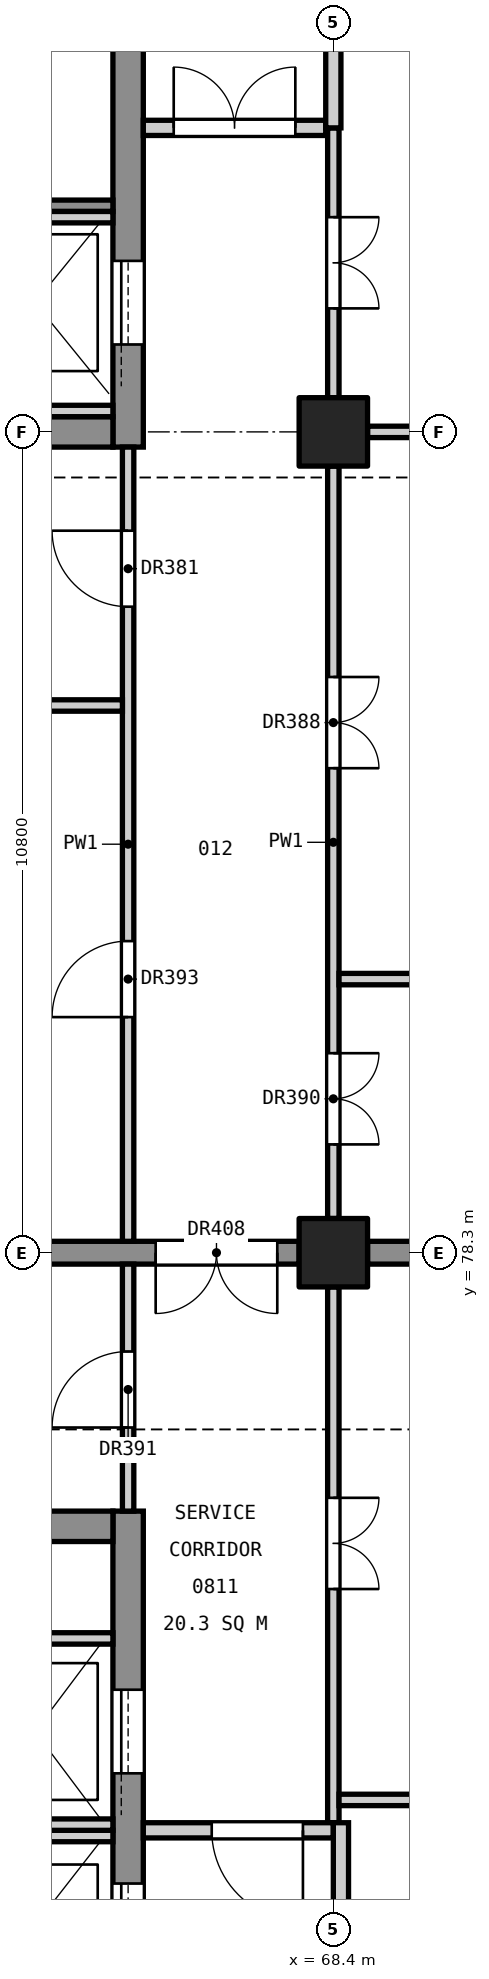
"""IFC4 building model, lengths in metres.
Left out: names, types, materials, properties, quantities, classifications, styles, units other than length and angle.
Written with IfcOpenShell. Run it as: python <this file> out.ifc"""

import sys

from ifc_helpers import new_model, si_unit, direction, frame, frame_2d, origin, origin_2d, place, context, subcontext, project, spatial, rectangle, extrude, element, fill, save


model = new_model("IFC4")
c1 = context("Model", 3, precision=1e-05, world=origin(), true_north=direction((0.0, 1.0)))
c2 = subcontext(c1, "Body", "Model", "MODEL_VIEW")
j1 = project(units=[si_unit("LENGTHUNIT", "METRE"), si_unit("PLANEANGLEUNIT", "RADIAN")], contexts=[c1])
p1 = place(None, origin())
s1 = spatial("IfcSite", under=j1, at=p1, CompositionType="ELEMENT")
p2 = place(p1, origin())
s2 = spatial("IfcBuilding", under=s1, at=p2, CompositionType="ELEMENT")
p3 = place(p2, frame((0.0, 0.0, 41.4)))
s3 = spatial("IfcBuildingStorey", under=s2, at=p3, CompositionType="ELEMENT", Elevation=41.4)
for number, where, z_axis, x_axis in (
    (1, (68.4, 78.3, 0.0), (0.0, 0.0, 1.0), (1.0, 0.0, 0.0)),
    (2, (68.4, 89.1, 0.0), (0.0, 0.0, 1.0), (1.0, 0.0, 0.0)),
):
    element("IfcColumn", number, at=place(p3, frame(where, z_axis=z_axis, x_axis=x_axis)), inside=s3, PredefinedType="COLUMN", context=c2, shape_type="SweptSolid", body=[
        extrude(rectangle(XDim=0.9, YDim=0.9, at=origin_2d()), origin(), (0.0, 0.0, 1.0), 4.8),
    ])
p4 = place(p3, frame((65.7, 60.1, 0.0), z_axis=(0.0, 0.0, 1.0), x_axis=(0.0, 1.0, 0.0)))
e3 = element("IfcWall", 3, at=p4, inside=s3, PredefinedType="SHEAR", context=c2, shape_type="SweptSolid", body=[
    extrude(rectangle(XDim=14.8, YDim=0.4, at=frame_2d((7.4, 0.0))), origin(), (0.0, 0.0, 1.0), 4.55),
])
p5 = place(p4, frame((0.5, 0.0, 0.0)))
e4 = element("IfcOpeningElement", 4, at=p5, cuts=e3, PredefinedType="OPENING", context=c2, shape_type="SweptSolid", body=[
    extrude(rectangle(XDim=1.4, YDim=2.1, at=frame_2d((0.7, 1.05))), frame((0.0, 0.21, 0.0), z_axis=(0.0, -1.0, 0.0), x_axis=(1.0, 0.0, 0.0)), (0.0, 0.0, 1.0), 0.42),
])
p6 = place(p4, frame((8.8, 0.0, 0.0)))
e5 = element("IfcOpeningElement", 5, at=p6, cuts=e3, PredefinedType="OPENING", context=c2, shape_type="SweptSolid", body=[
    extrude(rectangle(XDim=1.1, YDim=2.1, at=frame_2d((0.55, 1.05))), frame((0.0, 0.21, 0.0), z_axis=(0.0, -1.0, 0.0), x_axis=(1.0, 0.0, 0.0)), (0.0, 0.0, 1.0), 0.42),
])
p7 = place(p4, frame((11.35, 0.0, 0.0)))
e6 = element("IfcOpeningElement", 6, at=p7, cuts=e3, PredefinedType="OPENING", context=c2, shape_type="SweptSolid", body=[
    extrude(rectangle(XDim=1.1, YDim=2.1, at=frame_2d((0.55, 1.05))), frame((0.0, 0.21, 0.0), z_axis=(0.0, -1.0, 0.0), x_axis=(1.0, 0.0, 0.0)), (0.0, 0.0, 1.0), 0.42),
])
p8 = place(p3, frame((61.4, 74.7, 0.0), z_axis=(0.0, 0.0, 1.0), x_axis=(1.0, 0.0, 0.0)))
e7 = element("IfcWall", 7, at=p8, inside=s3, PredefinedType="SHEAR", context=c2, shape_type="SweptSolid", body=[
    extrude(rectangle(XDim=4.1, YDim=0.4, at=frame_2d((2.05, 0.0))), origin(), (0.0, 0.0, 1.0), 4.55),
])
p9 = place(p3, frame((65.7, 88.9, 0.0), z_axis=(0.0, 0.0, 1.0), x_axis=(0.0, 1.0, 0.0)))
e8 = element("IfcWall", 8, at=p9, inside=s3, PredefinedType="SHEAR", context=c2, shape_type="SweptSolid", body=[
    extrude(rectangle(XDim=11.2, YDim=0.4, at=frame_2d((5.6, 0.0))), origin(), (0.0, 0.0, 1.0), 4.55),
])
p10 = place(p9, frame((9.3, 0.0, 0.0)))
e9 = element("IfcOpeningElement", 9, at=p10, cuts=e8, PredefinedType="OPENING", context=c2, shape_type="SweptSolid", body=[
    extrude(rectangle(XDim=1.4, YDim=2.1, at=frame_2d((0.7, 1.05))), frame((0.0, 0.21, 0.0), z_axis=(0.0, -1.0, 0.0), x_axis=(1.0, 0.0, 0.0)), (0.0, 0.0, 1.0), 0.42),
])
p11 = place(p9, frame((1.35, 0.0, 0.0)))
e10 = element("IfcOpeningElement", 10, at=p11, cuts=e8, PredefinedType="OPENING", context=c2, shape_type="SweptSolid", body=[
    extrude(rectangle(XDim=1.1, YDim=2.1, at=frame_2d((0.55, 1.05))), frame((0.0, 0.21, 0.0), z_axis=(0.0, -1.0, 0.0), x_axis=(1.0, 0.0, 0.0)), (0.0, 0.0, 1.0), 0.42),
])
p12 = place(p3, frame((61.4, 89.1, 0.0), z_axis=(0.0, 0.0, 1.0), x_axis=(1.0, 0.0, 0.0)))
e11 = element("IfcWall", 11, at=p12, inside=s3, PredefinedType="SHEAR", context=c2, shape_type="SweptSolid", body=[
    extrude(rectangle(XDim=4.1, YDim=0.4, at=frame_2d((2.05, 0.0))), origin(), (0.0, 0.0, 1.0), 4.55),
])
p13 = place(p3, frame((61.65, 78.3, 0.0), z_axis=(0.0, 0.0, 1.0), x_axis=(1.0, 0.0, 0.0)))
e12 = element("IfcWall", 12, at=p13, inside=s3, PredefinedType="SHEAR", context=c2, shape_type="SweptSolid", body=[
    extrude(rectangle(XDim=6.3, YDim=0.3, at=frame_2d((3.15, 0.0))), origin(), (0.0, 0.0, 1.0), 4.55),
])
p14 = place(p13, frame((4.413, 0.0, 0.0)))
e13 = element("IfcOpeningElement", 13, at=p14, cuts=e12, PredefinedType="OPENING", context=c2, shape_type="SweptSolid", body=[
    extrude(rectangle(XDim=1.6, YDim=2.1, at=frame_2d((0.8, 1.05))), frame((0.0, 0.16, 0.0), z_axis=(0.0, -1.0, 0.0), x_axis=(1.0, 0.0, 0.0)), (0.0, 0.0, 1.0), 0.32),
])
p15 = place(p3, frame((68.85, 78.3, 0.0), z_axis=(0.0, 0.0, 1.0), x_axis=(1.0, 0.0, 0.0)))
e14 = element("IfcWall", 14, at=p15, inside=s3, PredefinedType="SHEAR", context=c2, shape_type="SweptSolid", body=[
    extrude(rectangle(XDim=9.9, YDim=0.3, at=frame_2d((4.95, 0.0))), origin(), (0.0, 0.0, 1.0), 4.55),
])
p16 = place(p3, frame((61.4, 92.075, 0.0), z_axis=(0.0, 0.0, 1.0), x_axis=(1.0, 0.0, 0.0)))
e15 = element("IfcWall", 15, at=p16, inside=s3, PredefinedType="SOLIDWALL", context=c2, shape_type="SweptSolid", body=[
    extrude(rectangle(XDim=4.1, YDim=0.15, at=frame_2d((2.05, 0.0))), origin(), (0.0, 0.0, 1.0), 4.55),
])
for number, where, z_axis, x_axis in (
    (16, (63.65, 70.625, 0.0), (0.0, 0.0, 1.0), (1.0, 0.0, 0.0)),
    (17, (63.65, 70.775, 0.0), (0.0, 0.0, 1.0), (1.0, 0.0, 0.0)),
    (18, (63.65, 73.225, 0.0), (0.0, 0.0, 1.0), (1.0, 0.0, 0.0)),
    (19, (63.65, 91.925, 0.0), (0.0, 0.0, 1.0), (1.0, 0.0, 0.0)),
    (20, (63.65, 89.375, 0.0), (0.0, 0.0, 1.0), (1.0, 0.0, 0.0)),
):
    element("IfcWall", number, at=place(p3, frame(where, z_axis=z_axis, x_axis=x_axis)), inside=s3, PredefinedType="SOLIDWALL", context=c2, shape_type="SweptSolid", body=[
        extrude(rectangle(XDim=1.85, YDim=0.15, at=frame_2d((0.925, 0.0))), origin(), (0.0, 0.0, 1.0), 4.8),
    ])
p17 = place(p3, frame((65.7, 74.9, 0.0), z_axis=(0.0, 0.0, 1.0), x_axis=(0.0, 1.0, 0.0)))
e21 = element("IfcWall", 21, at=p17, inside=s3, PredefinedType="PARTITIONING", context=c2, shape_type="SweptSolid", body=[
    extrude(rectangle(XDim=3.25, YDim=0.15, at=frame_2d((1.625, 0.0))), origin(), (0.0, 0.0, 1.0), 3.55),
])
p18 = place(p17, frame((1.1, 0.0, 0.0)))
e22 = element("IfcOpeningElement", 22, at=p18, cuts=e21, PredefinedType="OPENING", context=c2, shape_type="SweptSolid", body=[
    extrude(rectangle(XDim=1.0, YDim=2.1, at=frame_2d((0.5, 1.05))), frame((0.0, 0.085, 0.0), z_axis=(0.0, -1.0, 0.0), x_axis=(1.0, 0.0, 0.0)), (0.0, 0.0, 1.0), 0.17),
])
p19 = place(p3, frame((65.7, 78.45, 0.0), z_axis=(0.0, 0.0, 1.0), x_axis=(0.0, 1.0, 0.0)))
e23 = element("IfcWall", 23, at=p19, inside=s3, PredefinedType="PARTITIONING", context=c2, shape_type="SweptSolid", body=[
    extrude(rectangle(XDim=10.45, YDim=0.15, at=frame_2d((5.225, 0.0))), origin(), (0.0, 0.0, 1.0), 3.55),
])
p20 = place(p19, frame((8.35, 0.0, 0.0)))
e24 = element("IfcOpeningElement", 24, at=p20, cuts=e23, PredefinedType="OPENING", context=c2, shape_type="SweptSolid", body=[
    extrude(rectangle(XDim=1.0, YDim=2.1, at=frame_2d((0.5, 1.05))), frame((0.0, 0.085, 0.0), z_axis=(0.0, -1.0, 0.0), x_axis=(1.0, 0.0, 0.0)), (0.0, 0.0, 1.0), 0.17),
])
p21 = place(p19, frame((2.95, 0.0, 0.0)))
e25 = element("IfcOpeningElement", 25, at=p21, cuts=e23, PredefinedType="OPENING", context=c2, shape_type="SweptSolid", body=[
    extrude(rectangle(XDim=1.0, YDim=2.1, at=frame_2d((0.5, 1.05))), frame((0.0, 0.085, 0.0), z_axis=(0.0, -1.0, 0.0), x_axis=(1.0, 0.0, 0.0)), (0.0, 0.0, 1.0), 0.17),
])
p22 = place(p3, frame((61.35, 85.5, 0.0), z_axis=(0.0, 0.0, 1.0), x_axis=(1.0, 0.0, 0.0)))
e26 = element("IfcWall", 26, at=p22, inside=s3, PredefinedType="PARTITIONING", context=c2, shape_type="SweptSolid", body=[
    extrude(rectangle(XDim=4.275, YDim=0.15, at=frame_2d((2.137, 0.0))), origin(), (0.0, 0.0, 1.0), 3.85),
])
p23 = place(p3, frame((65.9, 93.1, 0.0), z_axis=(0.0, 0.0, 1.0), x_axis=(1.0, 0.0, 0.0)))
e27 = element("IfcWall", 27, at=p23, inside=s3, PredefinedType="PARTITIONING", context=c2, shape_type="SweptSolid", body=[
    extrude(rectangle(XDim=2.4, YDim=0.2, at=frame_2d((1.2, 0.0))), origin(), (0.0, 0.0, 1.0), 3.55),
])
p24 = place(p23, frame((0.4, 0.0, 0.0)))
e28 = element("IfcOpeningElement", 28, at=p24, cuts=e27, PredefinedType="OPENING", context=c2, shape_type="SweptSolid", body=[
    extrude(rectangle(XDim=1.6, YDim=2.1, at=frame_2d((0.8, 1.05))), frame((0.0, 0.11, 0.0), z_axis=(0.0, -1.0, 0.0), x_axis=(1.0, 0.0, 0.0)), (0.0, 0.0, 1.0), 0.22),
])
p25 = place(p3, frame((68.4, 70.8, 0.0), z_axis=(0.0, 0.0, 1.0), x_axis=(0.0, 1.0, 0.0)))
e29 = element("IfcWall", 29, at=p25, inside=s3, PredefinedType="PARTITIONING", context=c2, shape_type="SweptSolid", body=[
    extrude(rectangle(XDim=7.05, YDim=0.15, at=frame_2d((3.525, 0.0))), origin(), (0.0, 0.0, 1.0), 3.55),
])
p26 = place(p25, frame((3.075, 0.0, 0.0)))
e30 = element("IfcOpeningElement", 30, at=p26, cuts=e29, PredefinedType="OPENING", context=c2, shape_type="SweptSolid", body=[
    extrude(rectangle(XDim=1.2, YDim=2.1, at=frame_2d((0.6, 1.05))), frame((0.0, 0.085, 0.0), z_axis=(0.0, -1.0, 0.0), x_axis=(1.0, 0.0, 0.0)), (0.0, 0.0, 1.0), 0.17),
])
p27 = place(p3, frame((68.4, 78.75, 0.0), z_axis=(0.0, 0.0, 1.0), x_axis=(0.0, 1.0, 0.0)))
e31 = element("IfcWall", 31, at=p27, inside=s3, PredefinedType="PARTITIONING", context=c2, shape_type="SweptSolid", body=[
    extrude(rectangle(XDim=9.9, YDim=0.15, at=frame_2d((4.95, 0.0))), origin(), (0.0, 0.0, 1.0), 3.55),
])
p28 = place(p27, frame((5.925, 0.0, 0.0)))
e32 = element("IfcOpeningElement", 32, at=p28, cuts=e31, PredefinedType="OPENING", context=c2, shape_type="SweptSolid", body=[
    extrude(rectangle(XDim=1.2, YDim=2.1, at=frame_2d((0.6, 1.05))), frame((0.0, 0.085, 0.0), z_axis=(0.0, -1.0, 0.0), x_axis=(1.0, 0.0, 0.0)), (0.0, 0.0, 1.0), 0.17),
])
p29 = place(p27, frame((0.975, 0.0, 0.0)))
e33 = element("IfcOpeningElement", 33, at=p29, cuts=e31, PredefinedType="OPENING", context=c2, shape_type="SweptSolid", body=[
    extrude(rectangle(XDim=1.2, YDim=2.1, at=frame_2d((0.6, 1.05))), frame((0.0, 0.085, 0.0), z_axis=(0.0, -1.0, 0.0), x_axis=(1.0, 0.0, 0.0)), (0.0, 0.0, 1.0), 0.17),
])
p30 = place(p3, frame((68.4, 89.55, 0.0), z_axis=(0.0, 0.0, 1.0), x_axis=(0.0, 1.0, 0.0)))
e34 = element("IfcWall", 34, at=p30, inside=s3, PredefinedType="PARTITIONING", context=c2, shape_type="SweptSolid", body=[
    extrude(rectangle(XDim=3.55, YDim=0.15, at=frame_2d((1.775, 0.0))), origin(), (0.0, 0.0, 1.0), 3.55),
])
p31 = place(p30, frame((1.175, 0.0, 0.0)))
e35 = element("IfcOpeningElement", 35, at=p31, cuts=e34, PredefinedType="OPENING", context=c2, shape_type="SweptSolid", body=[
    extrude(rectangle(XDim=1.2, YDim=2.1, at=frame_2d((0.6, 1.05))), frame((0.0, 0.085, 0.0), z_axis=(0.0, -1.0, 0.0), x_axis=(1.0, 0.0, 0.0)), (0.0, 0.0, 1.0), 0.17),
])
p32 = place(p3, frame((68.4, 93.1, 0.0), z_axis=(0.0, 0.0, 1.0), x_axis=(0.0, 1.0, 0.0)))
e36 = element("IfcWall", 36, at=p32, inside=s3, PredefinedType="PARTITIONING", context=c2, shape_type="SweptSolid", body=[
    extrude(rectangle(XDim=6.35, YDim=0.2, at=frame_2d((3.175, 0.0))), origin(), (0.0, 0.0, 1.0), 3.55),
])
p33 = place(p3, frame((65.9, 70.7, 0.0), z_axis=(0.0, 0.0, 1.0), x_axis=(1.0, 0.0, 0.0)))
e37 = element("IfcWall", 37, at=p33, inside=s3, PredefinedType="PARTITIONING", context=c2, shape_type="SweptSolid", body=[
    extrude(rectangle(XDim=2.5, YDim=0.2, at=frame_2d((1.25, 0.0))), origin(), (0.0, 0.0, 1.0), 3.55),
])
p34 = place(p33, frame((0.9, 0.0, 0.0)))
e38 = element("IfcOpeningElement", 38, at=p34, cuts=e37, PredefinedType="OPENING", context=c2, shape_type="SweptSolid", body=[
    extrude(rectangle(XDim=1.2, YDim=2.1, at=frame_2d((0.6, 1.05))), frame((0.0, 0.11, 0.0), z_axis=(0.0, -1.0, 0.0), x_axis=(1.0, 0.0, 0.0)), (0.0, 0.0, 1.0), 0.22),
])
p35 = place(p3, frame((68.5, 67.95, 0.0), z_axis=(0.0, 0.0, 1.0), x_axis=(0.0, 1.0, 0.0)))
e39 = element("IfcWall", 39, at=p35, inside=s3, PredefinedType="PARTITIONING", context=c2, shape_type="SweptSolid", body=[
    extrude(rectangle(XDim=2.85, YDim=0.2, at=frame_2d((1.425, 0.0))), origin(), (0.0, 0.0, 1.0), 3.55),
])
for number, where, z_axis, x_axis in (
    (40, (68.475, 71.1, 0.0), (0.0, 0.0, 1.0), (1.0, 0.0, 0.0)),
    (41, (68.475, 81.9, 0.0), (0.0, 0.0, 1.0), (1.0, 0.0, 0.0)),
):
    element("IfcWall", number, at=place(p3, frame(where, z_axis=z_axis, x_axis=x_axis)), inside=s3, PredefinedType="PARTITIONING", context=c2, shape_type="SweptSolid", body=[
        extrude(rectangle(XDim=10.575, YDim=0.15, at=frame_2d((5.288, 0.0))), origin(), (0.0, 0.0, 1.0), 3.85),
    ])
p36 = place(p3, frame((68.85, 89.1, 0.0), z_axis=(0.0, 0.0, 1.0), x_axis=(1.0, 0.0, 0.0)))
e42 = element("IfcWall", 42, at=p36, inside=s3, PredefinedType="PARTITIONING", context=c2, shape_type="SweptSolid", body=[
    extrude(rectangle(XDim=9.9, YDim=0.15, at=frame_2d((4.95, 0.0))), origin(), (0.0, 0.0, 1.0), 3.85),
])
p37 = place(p6, origin())
e43 = element("IfcDoor", 43, at=p37, inside=s3, OperationType="SLIDING_TO_LEFT", PredefinedType="DOOR", context=c2, shape_type="SweptSolid", body=[
    extrude(rectangle(XDim=1.1, YDim=2.1, at=frame_2d((0.55, 1.05))), frame((0.0, 0.025, 0.0), z_axis=(0.0, -1.0, 0.0), x_axis=(1.0, 0.0, 0.0)), (0.0, 0.0, 1.0), 0.05),
])
fill(e5, e43)
p38 = place(p7, origin())
e44 = element("IfcDoor", 44, at=p38, inside=s3, OperationType="SLIDING_TO_LEFT", PredefinedType="DOOR", context=c2, shape_type="SweptSolid", body=[
    extrude(rectangle(XDim=1.1, YDim=2.1, at=frame_2d((0.55, 1.05))), frame((0.0, 0.025, 0.0), z_axis=(0.0, -1.0, 0.0), x_axis=(1.0, 0.0, 0.0)), (0.0, 0.0, 1.0), 0.05),
])
fill(e6, e44)
p39 = place(p11, origin())
e45 = element("IfcDoor", 45, at=p39, inside=s3, OperationType="SLIDING_TO_LEFT", PredefinedType="DOOR", context=c2, shape_type="SweptSolid", body=[
    extrude(rectangle(XDim=1.1, YDim=2.1, at=frame_2d((0.55, 1.05))), frame((0.0, 0.025, 0.0), z_axis=(0.0, -1.0, 0.0), x_axis=(1.0, 0.0, 0.0)), (0.0, 0.0, 1.0), 0.05),
])
fill(e10, e45)
p40 = place(p20, origin())
e46 = element("IfcDoor", 46, at=p40, inside=s3, OperationType="SINGLE_SWING_RIGHT", PredefinedType="DOOR", context=c2, shape_type="SweptSolid", body=[
    extrude(rectangle(XDim=1.0, YDim=2.1, at=frame_2d((0.5, 1.05))), frame((0.0, 0.025, 0.0), z_axis=(0.0, -1.0, 0.0), x_axis=(1.0, 0.0, 0.0)), (0.0, 0.0, 1.0), 0.05),
])
fill(e24, e46)
p41 = place(p31, frame((1.2, 0.0, 0.0), z_axis=(0.0, 0.0, 1.0), x_axis=(-1.0, 0.0, 0.0)))
e47 = element("IfcDoor", 47, at=p41, inside=s3, OperationType="DOUBLE_DOOR_SINGLE_SWING", PredefinedType="DOOR", context=c2, shape_type="SweptSolid", body=[
    extrude(rectangle(XDim=1.2, YDim=2.1, at=frame_2d((0.6, 1.05))), frame((0.0, 0.025, 0.0), z_axis=(0.0, -1.0, 0.0), x_axis=(1.0, 0.0, 0.0)), (0.0, 0.0, 1.0), 0.05),
])
fill(e35, e47)
p42 = place(p26, frame((1.2, 0.0, 0.0), z_axis=(0.0, 0.0, 1.0), x_axis=(-1.0, 0.0, 0.0)))
e48 = element("IfcDoor", 48, at=p42, inside=s3, OperationType="DOUBLE_DOOR_SINGLE_SWING", PredefinedType="DOOR", context=c2, shape_type="SweptSolid", body=[
    extrude(rectangle(XDim=1.2, YDim=2.1, at=frame_2d((0.6, 1.05))), frame((0.0, 0.025, 0.0), z_axis=(0.0, -1.0, 0.0), x_axis=(1.0, 0.0, 0.0)), (0.0, 0.0, 1.0), 0.05),
])
fill(e30, e48)
p43 = place(p28, frame((1.2, 0.0, 0.0), z_axis=(0.0, 0.0, 1.0), x_axis=(-1.0, 0.0, 0.0)))
e49 = element("IfcDoor", 49, at=p43, inside=s3, OperationType="DOUBLE_DOOR_SINGLE_SWING", PredefinedType="DOOR", context=c2, shape_type="SweptSolid", body=[
    extrude(rectangle(XDim=1.2, YDim=2.1, at=frame_2d((0.6, 1.05))), frame((0.0, 0.025, 0.0), z_axis=(0.0, -1.0, 0.0), x_axis=(1.0, 0.0, 0.0)), (0.0, 0.0, 1.0), 0.05),
])
fill(e32, e49)
p44 = place(p29, frame((1.2, 0.0, 0.0), z_axis=(0.0, 0.0, 1.0), x_axis=(-1.0, 0.0, 0.0)))
e50 = element("IfcDoor", 50, at=p44, inside=s3, OperationType="DOUBLE_DOOR_SINGLE_SWING", PredefinedType="DOOR", context=c2, shape_type="SweptSolid", body=[
    extrude(rectangle(XDim=1.2, YDim=2.1, at=frame_2d((0.6, 1.05))), frame((0.0, 0.025, 0.0), z_axis=(0.0, -1.0, 0.0), x_axis=(1.0, 0.0, 0.0)), (0.0, 0.0, 1.0), 0.05),
])
fill(e33, e50)
p45 = place(p18, origin())
e51 = element("IfcDoor", 51, at=p45, inside=s3, OperationType="SINGLE_SWING_LEFT", PredefinedType="DOOR", context=c2, shape_type="SweptSolid", body=[
    extrude(rectangle(XDim=1.0, YDim=2.1, at=frame_2d((0.5, 1.05))), frame((0.0, 0.025, 0.0), z_axis=(0.0, -1.0, 0.0), x_axis=(1.0, 0.0, 0.0)), (0.0, 0.0, 1.0), 0.05),
])
fill(e22, e51)
p46 = place(p21, origin())
e52 = element("IfcDoor", 52, at=p46, inside=s3, OperationType="SINGLE_SWING_LEFT", PredefinedType="DOOR", context=c2, shape_type="SweptSolid", body=[
    extrude(rectangle(XDim=1.0, YDim=2.1, at=frame_2d((0.5, 1.05))), frame((0.0, 0.025, 0.0), z_axis=(0.0, -1.0, 0.0), x_axis=(1.0, 0.0, 0.0)), (0.0, 0.0, 1.0), 0.05),
])
fill(e25, e52)
p47 = place(p34, frame((1.2, 0.0, 0.0), z_axis=(0.0, 0.0, 1.0), x_axis=(-1.0, 0.0, 0.0)))
e53 = element("IfcDoor", 53, at=p47, inside=s3, OperationType="SINGLE_SWING_LEFT", PredefinedType="DOOR", context=c2, shape_type="SweptSolid", body=[
    extrude(rectangle(XDim=1.2, YDim=2.1, at=frame_2d((0.6, 1.05))), frame((0.0, 0.025, 0.0), z_axis=(0.0, -1.0, 0.0), x_axis=(1.0, 0.0, 0.0)), (0.0, 0.0, 1.0), 0.05),
])
fill(e38, e53)
p48 = place(p24, origin())
e54 = element("IfcDoor", 54, at=p48, inside=s3, OperationType="DOUBLE_DOOR_SINGLE_SWING", PredefinedType="DOOR", context=c2, shape_type="SweptSolid", body=[
    extrude(rectangle(XDim=1.6, YDim=2.1, at=frame_2d((0.8, 1.05))), frame((0.0, 0.025, 0.0), z_axis=(0.0, -1.0, 0.0), x_axis=(1.0, 0.0, 0.0)), (0.0, 0.0, 1.0), 0.05),
])
fill(e28, e54)
p49 = place(p14, frame((1.6, 0.0, 0.0), z_axis=(0.0, 0.0, 1.0), x_axis=(-1.0, 0.0, 0.0)))
e55 = element("IfcDoor", 55, at=p49, inside=s3, OperationType="DOUBLE_DOOR_SINGLE_SWING", PredefinedType="DOOR", context=c2, shape_type="SweptSolid", body=[
    extrude(rectangle(XDim=1.6, YDim=2.1, at=frame_2d((0.8, 1.05))), frame((0.0, 0.025, 0.0), z_axis=(0.0, -1.0, 0.0), x_axis=(1.0, 0.0, 0.0)), (0.0, 0.0, 1.0), 0.05),
])
fill(e13, e55)
save(model, sys.argv[1])
